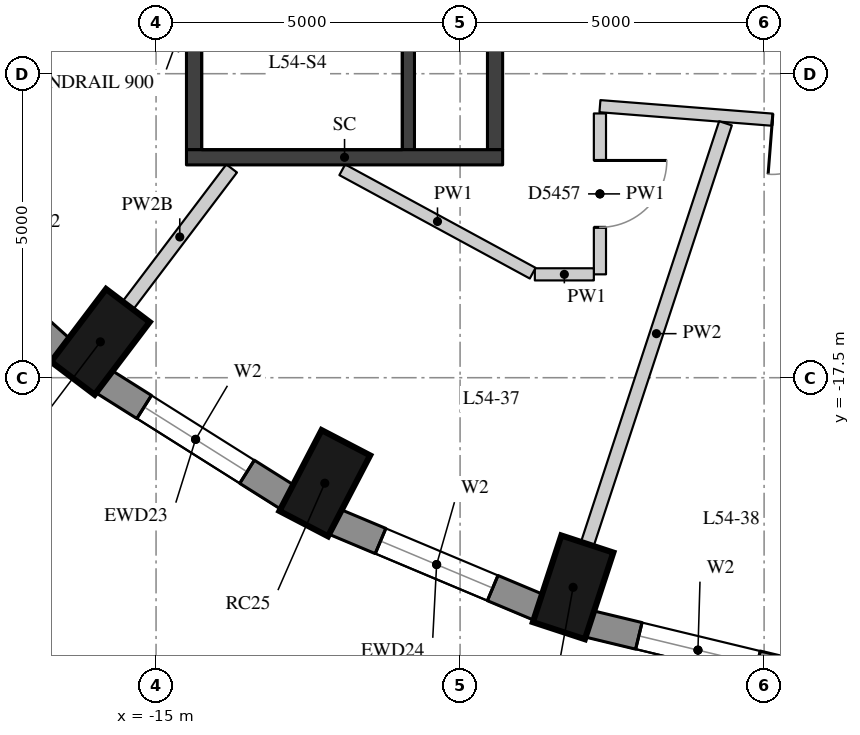
"""IFC4 building model, lengths in metres.
Left out: names, types, materials, properties, quantities, classifications, styles, units other than length and angle.
Written with IfcOpenShell. Run it as: python <this file> out.ifc"""

import sys

from ifc_helpers import new_model, si_unit, direction, frame, frame_2d, origin, origin_2d, place, context, subcontext, project, spatial, rectangle, extrude, element, fill, save


model = new_model("IFC4")
c1 = context("Model", 3, precision=1e-05, world=origin(), true_north=direction((0.0, 1.0)))
c2 = subcontext(c1, "Body", "Model", "MODEL_VIEW")
j1 = project(units=[si_unit("LENGTHUNIT", "METRE"), si_unit("PLANEANGLEUNIT", "RADIAN")], contexts=[c1])
p1 = place(None, origin())
s1 = spatial("IfcSite", under=j1, at=p1, CompositionType="ELEMENT")
p2 = place(p1, origin())
s2 = spatial("IfcBuilding", under=s1, at=p2, CompositionType="ELEMENT")
p3 = place(p2, frame((0.0, 0.0, 192.5)))
s3 = spatial("IfcBuildingStorey", under=s2, at=p3, CompositionType="ELEMENT", Elevation=192.5)
for number, where, z_axis, x_axis in (
    (1, (-15.916, -16.911, 0.0), (0.0, 0.0, 1.0), (-0.604, -0.797, 0.0)),
    (2, (-12.225, -19.235, 0.0), (0.0, 0.0, 1.0), (-0.462, -0.887, 0.0)),
    (3, (-8.141, -20.948, 0.0), (0.0, 0.0, 1.0), (-0.312, -0.95, 0.0)),
):
    element("IfcColumn", number, at=place(p3, frame(where, z_axis=z_axis, x_axis=x_axis)), inside=s3, PredefinedType="COLUMN", context=c2, shape_type="SweptSolid", body=[
        extrude(rectangle(XDim=1.5, YDim=0.9, at=origin_2d()), origin(), (0.0, 0.0, 1.0), 3.3),
    ])
p4 = place(p3, frame((-19.165, -14.69, 0.0), z_axis=(0.0, 0.0, 1.0), x_axis=(0.743442727602, -0.668799604348, 0.0)))
e4 = element("IfcWall", 4, at=p4, inside=s3, PredefinedType="SOLIDWALL", context=c2, shape_type="SweptSolid", body=[
    extrude(rectangle(XDim=3.513, YDim=0.45, at=frame_2d((1.756, 0.0))), origin(), (0.0, 0.0, 1.0), 3.02),
])
p5 = place(p4, frame((0.756, 0.0, 0.4)))
e5 = element("IfcOpeningElement", 5, at=p5, cuts=e4, PredefinedType="OPENING", context=c2, shape_type="SweptSolid", body=[
    extrude(rectangle(XDim=2.0, YDim=1.75, at=frame_2d((1.0, 0.875))), frame((0.0, 0.235, 0.0), z_axis=(0.0, -1.0, 0.0), x_axis=(1.0, 0.0, 0.0)), (0.0, 0.0, 1.0), 0.47),
])
p6 = place(p3, frame((-15.867, -17.559, 0.0), z_axis=(0.0, 0.0, 1.0), x_axis=(0.84616917791, -0.532914366813, 0.0)))
e6 = element("IfcWall", 6, at=p6, inside=s3, PredefinedType="SOLIDWALL", context=c2, shape_type="SweptSolid", body=[
    extrude(rectangle(XDim=3.587, YDim=0.45, at=frame_2d((1.793, 0.0))), origin(), (0.0, 0.0, 1.0), 3.02),
])
p7 = place(p6, frame((0.793, 0.0, 0.4)))
e7 = element("IfcOpeningElement", 7, at=p7, cuts=e6, PredefinedType="OPENING", context=c2, shape_type="SweptSolid", body=[
    extrude(rectangle(XDim=2.0, YDim=1.75, at=frame_2d((1.0, 0.875))), frame((0.0, 0.235, 0.0), z_axis=(0.0, -1.0, 0.0), x_axis=(1.0, 0.0, 0.0)), (0.0, 0.0, 1.0), 0.47),
])
p8 = place(p3, frame((-12.069, -19.867, 0.0), z_axis=(0.0, 0.0, 1.0), x_axis=(0.922168222612, -0.386789050006, 0.0)))
e8 = element("IfcWall", 8, at=p8, inside=s3, PredefinedType="SOLIDWALL", context=c2, shape_type="SweptSolid", body=[
    extrude(rectangle(XDim=3.651, YDim=0.45, at=frame_2d((1.825, 0.0))), origin(), (0.0, 0.0, 1.0), 3.02),
])
p9 = place(p8, frame((0.825, 0.0, 0.4)))
e9 = element("IfcOpeningElement", 9, at=p9, cuts=e8, PredefinedType="OPENING", context=c2, shape_type="SweptSolid", body=[
    extrude(rectangle(XDim=2.0, YDim=1.75, at=frame_2d((1.0, 0.875))), frame((0.0, 0.235, 0.0), z_axis=(0.0, -1.0, 0.0), x_axis=(1.0, 0.0, 0.0)), (0.0, 0.0, 1.0), 0.47),
])
p10 = place(p3, frame((-7.885, -21.547, 0.0), z_axis=(0.0, 0.0, 1.0), x_axis=(0.9721584944, -0.234324266275, 0.0)))
e10 = element("IfcWall", 10, at=p10, inside=s3, PredefinedType="SOLIDWALL", context=c2, shape_type="SweptSolid", body=[
    extrude(rectangle(XDim=3.698, YDim=0.45, at=frame_2d((1.849, 0.0))), origin(), (0.0, 0.0, 1.0), 3.02),
])
p11 = place(p10, frame((0.849, 0.0, 0.4)))
e11 = element("IfcOpeningElement", 11, at=p11, cuts=e10, PredefinedType="OPENING", context=c2, shape_type="SweptSolid", body=[
    extrude(rectangle(XDim=2.0, YDim=1.75, at=frame_2d((1.0, 0.875))), frame((0.0, 0.235, 0.0), z_axis=(0.0, -1.0, 0.0), x_axis=(1.0, 0.0, 0.0)), (0.0, 0.0, 1.0), 0.47),
])
p12 = place(p3, frame((-10.85, -13.75, 0.0), z_axis=(0.0, 0.0, 1.0), x_axis=(0.0, 1.0, 0.0)))
e12 = element("IfcWall", 12, at=p12, inside=s3, PredefinedType="SHEAR", context=c2, shape_type="SweptSolid", body=[
    extrude(rectangle(XDim=6.0, YDim=0.2, at=frame_2d((3.0, 0.0))), origin(), (0.0, 0.0, 1.0), 3.02),
])
p13 = place(p12, frame((4.4, 0.0, 0.0)))
e13 = element("IfcOpeningElement", 13, at=p13, cuts=e12, PredefinedType="OPENING", context=c2, shape_type="SweptSolid", body=[
    extrude(rectangle(XDim=1.5, YDim=2.1, at=frame_2d((0.75, 1.05))), frame((0.0, 0.11, 0.0), z_axis=(0.0, -1.0, 0.0), x_axis=(1.0, 0.0, 0.0)), (0.0, 0.0, 1.0), 0.22),
])
p14 = place(p3, frame((-14.375, -13.75, -0.28), z_axis=(0.0, 0.0, 1.0), x_axis=(0.0, 1.0, 0.0)))
e14 = element("IfcWall", 14, at=p14, inside=s3, PredefinedType="SHEAR", context=c2, shape_type="SweptSolid", body=[
    extrude(rectangle(XDim=6.0, YDim=0.25, at=frame_2d((3.0, 0.0))), origin(), (0.0, 0.0, 1.0), 3.3),
])
p15 = place(p3, frame((-9.425, -13.75, -0.28), z_axis=(0.0, 0.0, 1.0), x_axis=(0.0, 1.0, 0.0)))
e15 = element("IfcWall", 15, at=p15, inside=s3, PredefinedType="SHEAR", context=c2, shape_type="SweptSolid", body=[
    extrude(rectangle(XDim=6.0, YDim=0.25, at=frame_2d((3.0, 0.0))), origin(), (0.0, 0.0, 1.0), 3.3),
])
p16 = place(p15, frame((2.4, 0.0, 0.28)))
e16 = element("IfcOpeningElement", 16, at=p16, cuts=e15, PredefinedType="OPENING", context=c2, shape_type="SweptSolid", body=[
    extrude(rectangle(XDim=1.5, YDim=2.1, at=frame_2d((0.75, 1.05))), frame((0.0, 0.135, 0.0), z_axis=(0.0, -1.0, 0.0), x_axis=(1.0, 0.0, 0.0)), (0.0, 0.0, 1.0), 0.27),
])
p17 = place(p3, frame((-14.5, -13.875, -0.28), z_axis=(0.0, 0.0, 1.0), x_axis=(1.0, 0.0, 0.0)))
e17 = element("IfcWall", 17, at=p17, inside=s3, PredefinedType="SHEAR", context=c2, shape_type="SweptSolid", body=[
    extrude(rectangle(XDim=5.2, YDim=0.25, at=frame_2d((2.6, 0.0))), origin(), (0.0, 0.0, 1.0), 3.3),
])
p18 = place(p3, frame((3.881, -13.943, 0.0), z_axis=(0.0, 0.0, 1.0), x_axis=(-0.996932335491, 0.078268246772, 0.0)))
e18 = element("IfcWall", 18, at=p18, inside=s3, PredefinedType="PARTITIONING", context=c2, shape_type="SweptSolid", body=[
    extrude(rectangle(XDim=11.616, YDim=0.2, at=frame_2d((5.808, 0.0))), origin(), (0.0, 0.0, 1.0), 2.57),
])
p19 = place(p18, frame((7.871, 0.0, 0.0)))
e19 = element("IfcOpeningElement", 19, at=p19, cuts=e18, PredefinedType="OPENING", context=c2, shape_type="SweptSolid", body=[
    extrude(rectangle(XDim=0.9, YDim=2.1, at=frame_2d((0.45, 1.05))), frame((0.0, 0.11, 0.0), z_axis=(0.0, -1.0, 0.0), x_axis=(1.0, 0.0, 0.0)), (0.0, 0.0, 1.0), 0.22),
])
p20 = place(p18, frame((5.062, 0.0, 0.0)))
e20 = element("IfcOpeningElement", 20, at=p20, cuts=e18, PredefinedType="OPENING", context=c2, shape_type="SweptSolid", body=[
    extrude(rectangle(XDim=0.9, YDim=2.1, at=frame_2d((0.45, 1.05))), frame((0.0, 0.11, 0.0), z_axis=(0.0, -1.0, 0.0), x_axis=(1.0, 0.0, 0.0)), (0.0, 0.0, 1.0), 0.22),
])
p21 = place(p18, frame((1.554, 0.0, 0.0)))
e21 = element("IfcOpeningElement", 21, at=p21, cuts=e18, PredefinedType="OPENING", context=c2, shape_type="SweptSolid", body=[
    extrude(rectangle(XDim=0.9, YDim=2.1, at=frame_2d((0.45, 1.05))), frame((0.0, 0.11, 0.0), z_axis=(0.0, -1.0, 0.0), x_axis=(1.0, 0.0, 0.0)), (0.0, 0.0, 1.0), 0.22),
])
p22 = place(p3, frame((-7.7, -13.154, 0.0), z_axis=(0.0, 0.0, 1.0), x_axis=(0.0, -1.0, 0.0)))
e22 = element("IfcWall", 22, at=p22, inside=s3, PredefinedType="PARTITIONING", context=c2, shape_type="SweptSolid", body=[
    extrude(rectangle(XDim=2.646, YDim=0.2, at=frame_2d((1.323, 0.0))), origin(), (0.0, 0.0, 1.0), 3.02),
])
p23 = place(p22, frame((0.773, 0.0, 0.0)))
e23 = element("IfcOpeningElement", 23, at=p23, cuts=e22, PredefinedType="OPENING", context=c2, shape_type="SweptSolid", body=[
    extrude(rectangle(XDim=1.1, YDim=2.1, at=frame_2d((0.55, 1.05))), frame((0.0, 0.11, 0.0), z_axis=(0.0, -1.0, 0.0), x_axis=(1.0, 0.0, 0.0)), (0.0, 0.0, 1.0), 0.22),
])
p24 = place(p3, frame((-7.8, -15.8, 0.0), z_axis=(0.0, 0.0, 1.0), x_axis=(-1.0, 0.0, 0.0)))
e24 = element("IfcWall", 24, at=p24, inside=s3, PredefinedType="PARTITIONING", context=c2, shape_type="SweptSolid", body=[
    extrude(rectangle(XDim=0.97, YDim=0.2, at=frame_2d((0.485, 0.0))), origin(), (0.0, 0.0, 1.0), 3.02),
])
p25 = place(p3, frame((-8.806, -15.781, 0.0), z_axis=(0.0, 0.0, 1.0), x_axis=(-0.878760680736, 0.477262680284, 0.0)))
e25 = element("IfcWall", 25, at=p25, inside=s3, PredefinedType="PARTITIONING", context=c2, shape_type="SweptSolid", body=[
    extrude(rectangle(XDim=3.564, YDim=0.2, at=frame_2d((1.782, 0.0))), origin(), (0.0, 0.0, 1.0), 3.02),
])
p26 = place(p3, frame((-15.463, -16.312, 0.0), z_axis=(0.0, 0.0, 1.0), x_axis=(0.603613294085, 0.797277236101, 0.0)))
e26 = element("IfcWall", 26, at=p26, inside=s3, PredefinedType="PARTITIONING", context=c2, shape_type="SweptSolid", body=[
    extrude(rectangle(XDim=2.828, YDim=0.22, at=frame_2d((1.414, 0.0))), origin(), (0.0, 0.0, 1.0), 2.57),
])
p27 = place(p3, frame((-7.907, -20.235, 0.0), z_axis=(0.0, 0.0, 1.0), x_axis=(0.311980831408, 0.950088396326, 0.0)))
e27 = element("IfcWall", 27, at=p27, inside=s3, PredefinedType="PARTITIONING", context=c2, shape_type="SweptSolid", body=[
    extrude(rectangle(XDim=7.283, YDim=0.22, at=frame_2d((3.642, 0.0))), origin(), (0.0, 0.0, 1.0), 3.02),
])
p28 = place(p7, origin())
e28 = element("IfcWindow", 28, at=p28, inside=s3, PartitioningType="SINGLE_PANEL", PredefinedType="WINDOW", context=c2, shape_type="SweptSolid", body=[
    extrude(rectangle(XDim=2.0, YDim=1.75, at=frame_2d((1.0, 0.875))), frame((0.0, 0.035, 0.0), z_axis=(0.0, -1.0, 0.0), x_axis=(1.0, 0.0, 0.0)), (0.0, 0.0, 1.0), 0.06),
])
fill(e7, e28)
p29 = place(p9, origin())
e29 = element("IfcWindow", 29, at=p29, inside=s3, PartitioningType="SINGLE_PANEL", PredefinedType="WINDOW", context=c2, shape_type="SweptSolid", body=[
    extrude(rectangle(XDim=2.0, YDim=1.75, at=frame_2d((1.0, 0.875))), frame((0.0, 0.035, 0.0), z_axis=(0.0, -1.0, 0.0), x_axis=(1.0, 0.0, 0.0)), (0.0, 0.0, 1.0), 0.06),
])
fill(e9, e29)
p30 = place(p11, origin())
e30 = element("IfcWindow", 30, at=p30, inside=s3, PartitioningType="SINGLE_PANEL", PredefinedType="WINDOW", context=c2, shape_type="SweptSolid", body=[
    extrude(rectangle(XDim=2.0, YDim=1.75, at=frame_2d((1.0, 0.875))), frame((0.0, 0.035, 0.0), z_axis=(0.0, -1.0, 0.0), x_axis=(1.0, 0.0, 0.0)), (0.0, 0.0, 1.0), 0.06),
])
fill(e11, e30)
p31 = place(p23, origin())
e31 = element("IfcDoor", 31, at=p31, inside=s3, OperationType="SINGLE_SWING_LEFT", PredefinedType="DOOR", context=c2, shape_type="SweptSolid", body=[
    extrude(rectangle(XDim=1.1, YDim=2.1, at=frame_2d((0.55, 1.05))), frame((0.0, 0.025, 0.0), z_axis=(0.0, -1.0, 0.0), x_axis=(1.0, 0.0, 0.0)), (0.0, 0.0, 1.0), 0.05),
])
fill(e23, e31)
p32 = place(p19, origin())
e32 = element("IfcDoor", 32, at=p32, inside=s3, OperationType="SINGLE_SWING_RIGHT", PredefinedType="DOOR", context=c2, shape_type="SweptSolid", body=[
    extrude(rectangle(XDim=0.9, YDim=2.1, at=frame_2d((0.45, 1.05))), frame((0.0, 0.025, 0.0), z_axis=(0.0, -1.0, 0.0), x_axis=(1.0, 0.0, 0.0)), (0.0, 0.0, 1.0), 0.05),
])
fill(e19, e32)
save(model, sys.argv[1])
